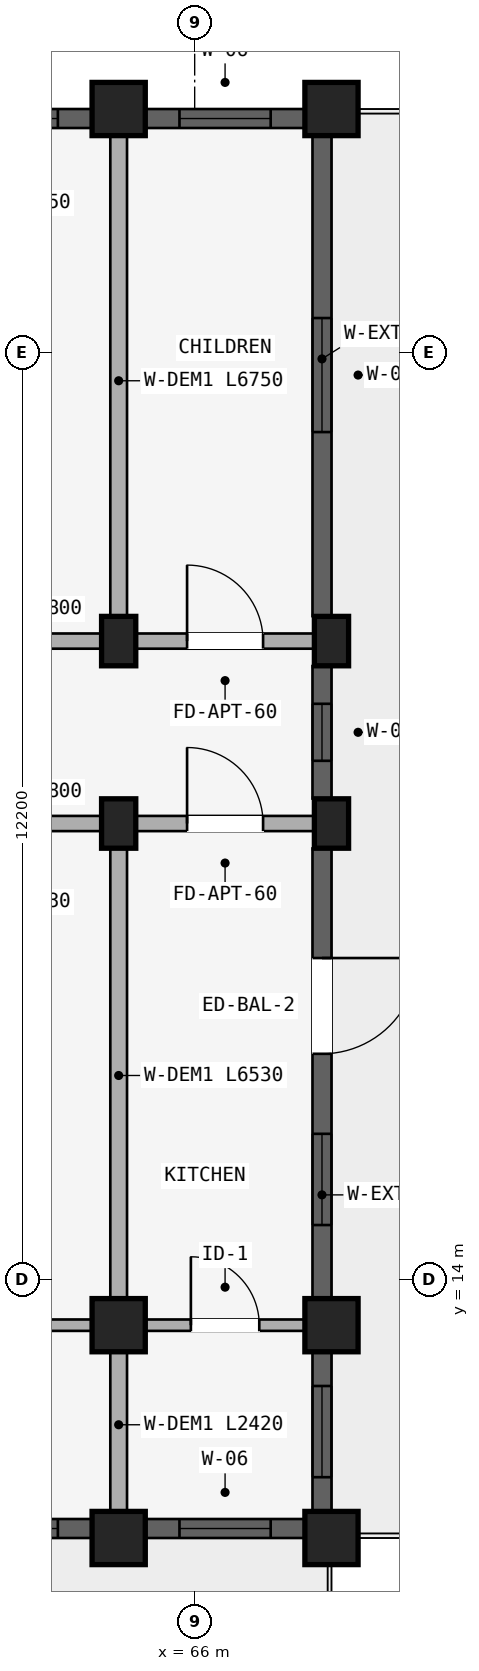
"""IFC4 building model, lengths in metres.
Left out: names, types, materials, properties, quantities, classifications, styles, units other than length and angle.
Written with IfcOpenShell. Run it as: python <this file> out.ifc"""

import sys

from ifc_helpers import new_model, si_unit, direction, frame, frame_2d, origin, origin_2d, place, context, subcontext, project, spatial, rectangle, extrude, element, fill, save


model = new_model("IFC4")
c1 = context("Model", 3, precision=1e-05, world=origin(), true_north=direction((0.0, 1.0)))
c2 = subcontext(c1, "Body", "Model", "MODEL_VIEW")
j1 = project(units=[si_unit("LENGTHUNIT", "METRE"), si_unit("PLANEANGLEUNIT", "RADIAN")], contexts=[c1])
p1 = place(None, origin())
s1 = spatial("IfcSite", under=j1, at=p1, CompositionType="ELEMENT")
p2 = place(p1, origin())
s2 = spatial("IfcBuilding", under=s1, at=p2, CompositionType="ELEMENT")
p3 = place(p2, frame((0.0, 0.0, 27.6)))
s3 = spatial("IfcBuildingStorey", under=s2, at=p3, CompositionType="ELEMENT", Elevation=27.6)
p4 = place(p3, frame((65.0, 29.4, 0.0), z_axis=(0.0, 0.0, 1.0), x_axis=(1.0, 0.0, 0.0)))
e1 = element("IfcColumn", 1, at=p4, inside=s3, PredefinedType="COLUMN", context=c2, shape_type="SweptSolid", body=[
    extrude(rectangle(XDim=0.7, YDim=0.7, at=origin_2d()), origin(), (0.0, 0.0, 1.0), 2.93),
])
for number, where, z_axis, x_axis in (
    (2, (65.0, 22.4, 0.0), (0.0, 0.0, 1.0), (1.0, 0.0, 0.0)),
    (3, (65.0, 20.0, 0.0), (0.0, 0.0, 1.0), (1.0, 0.0, 0.0)),
):
    element("IfcColumn", number, at=place(p3, frame(where, z_axis=z_axis, x_axis=x_axis)), inside=s3, PredefinedType="COLUMN", context=c2, shape_type="SweptSolid", body=[
        extrude(rectangle(XDim=0.45, YDim=0.65, at=origin_2d()), origin(), (0.0, 0.0, 1.0), 2.93),
    ])
p5 = place(p3, frame((65.0, 13.4, 0.0), z_axis=(0.0, 0.0, 1.0), x_axis=(1.0, 0.0, 0.0)))
e4 = element("IfcColumn", 4, at=p5, inside=s3, PredefinedType="COLUMN", context=c2, shape_type="SweptSolid", body=[
    extrude(rectangle(XDim=0.7, YDim=0.7, at=origin_2d()), origin(), (0.0, 0.0, 1.0), 2.93),
])
p6 = place(p3, frame((65.0, 10.6, 0.0), z_axis=(0.0, 0.0, 1.0), x_axis=(1.0, 0.0, 0.0)))
e5 = element("IfcColumn", 5, at=p6, inside=s3, PredefinedType="COLUMN", context=c2, shape_type="SweptSolid", body=[
    extrude(rectangle(XDim=0.7, YDim=0.7, at=origin_2d()), origin(), (0.0, 0.0, 1.0), 2.97),
])
p7 = place(p3, frame((67.8, 29.4, 0.0), z_axis=(0.0, 0.0, 1.0), x_axis=(1.0, 0.0, 0.0)))
e6 = element("IfcColumn", 6, at=p7, inside=s3, PredefinedType="COLUMN", context=c2, shape_type="SweptSolid", body=[
    extrude(rectangle(XDim=0.7, YDim=0.7, at=origin_2d()), origin(), (0.0, 0.0, 1.0), 2.93),
])
for number, where, z_axis, x_axis in (
    (7, (67.8, 22.4, 0.0), (0.0, 0.0, 1.0), (1.0, 0.0, 0.0)),
    (8, (67.8, 20.0, 0.0), (0.0, 0.0, 1.0), (1.0, 0.0, 0.0)),
):
    element("IfcColumn", number, at=place(p3, frame(where, z_axis=z_axis, x_axis=x_axis)), inside=s3, PredefinedType="COLUMN", context=c2, shape_type="SweptSolid", body=[
        extrude(rectangle(XDim=0.45, YDim=0.65, at=origin_2d()), origin(), (0.0, 0.0, 1.0), 2.93),
    ])
p8 = place(p3, frame((67.8, 13.4, 0.0), z_axis=(0.0, 0.0, 1.0), x_axis=(1.0, 0.0, 0.0)))
e9 = element("IfcColumn", 9, at=p8, inside=s3, PredefinedType="COLUMN", context=c2, shape_type="SweptSolid", body=[
    extrude(rectangle(XDim=0.7, YDim=0.7, at=origin_2d()), origin(), (0.0, 0.0, 1.0), 2.93),
])
p9 = place(p3, frame((67.8, 10.6, 0.0), z_axis=(0.0, 0.0, 1.0), x_axis=(1.0, 0.0, 0.0)))
e10 = element("IfcColumn", 10, at=p9, inside=s3, PredefinedType="COLUMN", context=c2, shape_type="SweptSolid", body=[
    extrude(rectangle(XDim=0.7, YDim=0.7, at=origin_2d()), origin(), (0.0, 0.0, 1.0), 2.97),
])
for number, where, z_axis, x_axis in (
    (11, (62.2, 22.4, 0.0), (0.0, 0.0, 1.0), (1.0, 0.0, 0.0)),
    (12, (62.2, 20.0, 0.0), (0.0, 0.0, 1.0), (1.0, 0.0, 0.0)),
):
    element("IfcWall", number, at=place(p3, frame(where, z_axis=z_axis, x_axis=x_axis)), inside=s3, PredefinedType="STANDARD", context=c2, shape_type="SweptSolid", body=[
        extrude(rectangle(XDim=2.8, YDim=0.2, at=frame_2d((1.4, 0.0))), origin(), (0.0, 0.0, 1.0), 2.372),
    ])
p10 = place(p3, frame((62.28, 13.4, 0.0), z_axis=(0.0, 0.0, 1.0), x_axis=(1.0, 0.0, 0.0)))
e13 = element("IfcWall", 13, at=p10, inside=s3, PredefinedType="PLUMBINGWALL", context=c2, shape_type="SweptSolid", body=[
    extrude(rectangle(XDim=2.64, YDim=0.15, at=frame_2d((1.32, 0.0))), origin(), (0.0, 0.0, 1.0), 2.372),
])
p11 = place(p10, frame((0.92, 0.0, 0.0)))
e14 = element("IfcOpeningElement", 14, at=p11, cuts=e13, PredefinedType="OPENING", context=c2, shape_type="SweptSolid", body=[
    extrude(rectangle(XDim=0.8, YDim=2.1, at=frame_2d((0.4, 1.05))), frame((0.0, 0.085, 0.0), z_axis=(0.0, -1.0, 0.0), x_axis=(1.0, 0.0, 0.0)), (0.0, 0.0, 1.0), 0.17),
])
p12 = place(p3, frame((65.0, 22.4, 0.0), z_axis=(0.0, 0.0, 1.0), x_axis=(1.0, 0.0, 0.0)))
e15 = element("IfcWall", 15, at=p12, inside=s3, PredefinedType="STANDARD", context=c2, shape_type="SweptSolid", body=[
    extrude(rectangle(XDim=2.8, YDim=0.2, at=frame_2d((1.4, 0.0))), origin(), (0.0, 0.0, 1.0), 2.372),
])
p13 = place(p12, frame((0.9, 0.0, 0.0)))
e16 = element("IfcOpeningElement", 16, at=p13, cuts=e15, PredefinedType="OPENING", context=c2, shape_type="SweptSolid", body=[
    extrude(rectangle(XDim=1.0, YDim=2.15, at=frame_2d((0.5, 1.075))), frame((0.0, 0.11, 0.0), z_axis=(0.0, -1.0, 0.0), x_axis=(1.0, 0.0, 0.0)), (0.0, 0.0, 1.0), 0.22),
])
p14 = place(p3, frame((65.0, 20.0, 0.0), z_axis=(0.0, 0.0, 1.0), x_axis=(1.0, 0.0, 0.0)))
e17 = element("IfcWall", 17, at=p14, inside=s3, PredefinedType="STANDARD", context=c2, shape_type="SweptSolid", body=[
    extrude(rectangle(XDim=2.8, YDim=0.2, at=frame_2d((1.4, 0.0))), origin(), (0.0, 0.0, 1.0), 2.372),
])
p15 = place(p14, frame((0.9, 0.0, 0.0)))
e18 = element("IfcOpeningElement", 18, at=p15, cuts=e17, PredefinedType="OPENING", context=c2, shape_type="SweptSolid", body=[
    extrude(rectangle(XDim=1.0, YDim=2.15, at=frame_2d((0.5, 1.075))), frame((0.0, 0.11, 0.0), z_axis=(0.0, -1.0, 0.0), x_axis=(1.0, 0.0, 0.0)), (0.0, 0.0, 1.0), 0.22),
])
p16 = place(p3, frame((65.08, 13.4, 0.0), z_axis=(0.0, 0.0, 1.0), x_axis=(1.0, 0.0, 0.0)))
e19 = element("IfcWall", 19, at=p16, inside=s3, PredefinedType="PLUMBINGWALL", context=c2, shape_type="SweptSolid", body=[
    extrude(rectangle(XDim=2.64, YDim=0.15, at=frame_2d((1.32, 0.0))), origin(), (0.0, 0.0, 1.0), 2.372),
])
p17 = place(p16, frame((0.87, 0.0, 0.0)))
e20 = element("IfcOpeningElement", 20, at=p17, cuts=e19, PredefinedType="OPENING", context=c2, shape_type="SweptSolid", body=[
    extrude(rectangle(XDim=0.9, YDim=2.1, at=frame_2d((0.45, 1.05))), frame((0.0, 0.085, 0.0), z_axis=(0.0, -1.0, 0.0), x_axis=(1.0, 0.0, 0.0)), (0.0, 0.0, 1.0), 0.17),
])
p18 = place(p3, frame((65.0, 29.2, 0.0), z_axis=(0.0, 0.0, 1.0), x_axis=(0.0, -1.0, 0.0)))
e21 = element("IfcWall", 21, at=p18, inside=s3, PredefinedType="STANDARD", context=c2, shape_type="SweptSolid", body=[
    extrude(rectangle(XDim=6.75, YDim=0.22, at=frame_2d((3.375, 0.0))), origin(), (0.0, 0.0, 1.0), 2.372),
])
p19 = place(p3, frame((65.0, 19.95, 0.0), z_axis=(0.0, 0.0, 1.0), x_axis=(0.0, -1.0, 0.0)))
e22 = element("IfcWall", 22, at=p19, inside=s3, PredefinedType="STANDARD", context=c2, shape_type="SweptSolid", body=[
    extrude(rectangle(XDim=6.53, YDim=0.22, at=frame_2d((3.265, 0.0))), origin(), (0.0, 0.0, 1.0), 2.372),
])
p20 = place(p3, frame((65.0, 13.3, 0.0), z_axis=(0.0, 0.0, 1.0), x_axis=(0.0, -1.0, 0.0)))
e23 = element("IfcWall", 23, at=p20, inside=s3, PredefinedType="STANDARD", context=c2, shape_type="SweptSolid", body=[
    extrude(rectangle(XDim=2.42, YDim=0.22, at=frame_2d((1.21, 0.0))), origin(), (0.0, 0.0, 1.0), 2.372),
])
p21 = place(p3, frame((62.553, 10.725, 0.0), z_axis=(0.0, 0.0, 1.0), x_axis=(1.0, 0.0, 0.0)))
e24 = element("IfcWall", 24, at=p21, inside=s3, PredefinedType="STANDARD", context=c2, shape_type="SweptSolid", body=[
    extrude(rectangle(XDim=2.093, YDim=0.25, at=frame_2d((1.046, 0.0))), origin(), (0.0, 0.0, 1.0), 2.48),
])
p22 = place(p21, frame((0.447, 0.0, 0.78)))
e25 = element("IfcOpeningElement", 25, at=p22, cuts=e24, PredefinedType="OPENING", context=c2, shape_type="SweptSolid", body=[
    extrude(rectangle(XDim=1.2, YDim=1.5, at=frame_2d((0.6, 0.75))), frame((0.0, 0.135, 0.0), z_axis=(0.0, -1.0, 0.0), x_axis=(1.0, 0.0, 0.0)), (0.0, 0.0, 1.0), 0.27),
])
p23 = place(p3, frame((65.354, 10.725, 0.0), z_axis=(0.0, 0.0, 1.0), x_axis=(1.0, 0.0, 0.0)))
e26 = element("IfcWall", 26, at=p23, inside=s3, PredefinedType="STANDARD", context=c2, shape_type="SweptSolid", body=[
    extrude(rectangle(XDim=2.093, YDim=0.25, at=frame_2d((1.046, 0.0))), origin(), (0.0, 0.0, 1.0), 2.48),
])
p24 = place(p23, frame((0.447, 0.0, 0.78)))
e27 = element("IfcOpeningElement", 27, at=p24, cuts=e26, PredefinedType="OPENING", context=c2, shape_type="SweptSolid", body=[
    extrude(rectangle(XDim=1.2, YDim=1.5, at=frame_2d((0.6, 0.75))), frame((0.0, 0.135, 0.0), z_axis=(0.0, -1.0, 0.0), x_axis=(1.0, 0.0, 0.0)), (0.0, 0.0, 1.0), 0.27),
])
p25 = place(p3, frame((62.553, 29.275, 0.0), z_axis=(0.0, 0.0, 1.0), x_axis=(1.0, 0.0, 0.0)))
e28 = element("IfcWall", 28, at=p25, inside=s3, PredefinedType="STANDARD", context=c2, shape_type="SweptSolid", body=[
    extrude(rectangle(XDim=2.093, YDim=0.25, at=frame_2d((1.046, 0.0))), origin(), (0.0, 0.0, 1.0), 2.472),
])
p26 = place(p25, frame((0.447, 0.0, 0.772)))
e29 = element("IfcOpeningElement", 29, at=p26, cuts=e28, PredefinedType="OPENING", context=c2, shape_type="SweptSolid", body=[
    extrude(rectangle(XDim=1.2, YDim=1.5, at=frame_2d((0.6, 0.75))), frame((0.0, 0.135, 0.0), z_axis=(0.0, -1.0, 0.0), x_axis=(1.0, 0.0, 0.0)), (0.0, 0.0, 1.0), 0.27),
])
p27 = place(p3, frame((65.354, 29.275, 0.0), z_axis=(0.0, 0.0, 1.0), x_axis=(1.0, 0.0, 0.0)))
e30 = element("IfcWall", 30, at=p27, inside=s3, PredefinedType="STANDARD", context=c2, shape_type="SweptSolid", body=[
    extrude(rectangle(XDim=2.093, YDim=0.25, at=frame_2d((1.046, 0.0))), origin(), (0.0, 0.0, 1.0), 2.472),
])
p28 = place(p27, frame((0.447, 0.0, 0.772)))
e31 = element("IfcOpeningElement", 31, at=p28, cuts=e30, PredefinedType="OPENING", context=c2, shape_type="SweptSolid", body=[
    extrude(rectangle(XDim=1.2, YDim=1.5, at=frame_2d((0.6, 0.75))), frame((0.0, 0.135, 0.0), z_axis=(0.0, -1.0, 0.0), x_axis=(1.0, 0.0, 0.0)), (0.0, 0.0, 1.0), 0.27),
])
p29 = place(p3, frame((67.675, 29.046, 0.0), z_axis=(0.0, 0.0, 1.0), x_axis=(0.0, -1.0, 0.0)))
e32 = element("IfcWall", 32, at=p29, inside=s3, PredefinedType="STANDARD", context=c2, shape_type="SweptSolid", body=[
    extrude(rectangle(XDim=6.318, YDim=0.25, at=frame_2d((3.159, 0.0))), origin(), (0.0, 0.0, 1.0), 2.372),
])
p30 = place(p29, frame((2.396, 0.0, 0.522)))
e33 = element("IfcOpeningElement", 33, at=p30, cuts=e32, PredefinedType="OPENING", context=c2, shape_type="SweptSolid", body=[
    extrude(rectangle(XDim=1.5, YDim=1.65, at=frame_2d((0.75, 0.825))), frame((0.0, 0.135, 0.0), z_axis=(0.0, -1.0, 0.0), x_axis=(1.0, 0.0, 0.0)), (0.0, 0.0, 1.0), 0.27),
])
p31 = place(p3, frame((67.675, 22.072, 0.0), z_axis=(0.0, 0.0, 1.0), x_axis=(0.0, -1.0, 0.0)))
e34 = element("IfcWall", 34, at=p31, inside=s3, PredefinedType="STANDARD", context=c2, shape_type="SweptSolid", body=[
    extrude(rectangle(XDim=1.743, YDim=0.25, at=frame_2d((0.872, 0.0))), origin(), (0.0, 0.0, 1.0), 2.372),
])
p32 = place(p31, frame((0.497, 0.0, 0.88)))
e35 = element("IfcOpeningElement", 35, at=p32, cuts=e34, PredefinedType="OPENING", context=c2, shape_type="SweptSolid", body=[
    extrude(rectangle(XDim=0.75, YDim=1.05, at=frame_2d((0.375, 0.525))), frame((0.0, 0.135, 0.0), z_axis=(0.0, -1.0, 0.0), x_axis=(1.0, 0.0, 0.0)), (0.0, 0.0, 1.0), 0.27),
])
p33 = place(p3, frame((67.675, 19.671, 0.0), z_axis=(0.0, 0.0, 1.0), x_axis=(0.0, -1.0, 0.0)))
e36 = element("IfcWall", 36, at=p33, inside=s3, PredefinedType="STANDARD", context=c2, shape_type="SweptSolid", body=[
    extrude(rectangle(XDim=5.918, YDim=0.25, at=frame_2d((2.959, 0.0))), origin(), (0.0, 0.0, 1.0), 2.372),
])
p34 = place(p33, frame((3.754, 0.0, 0.522)))
e37 = element("IfcOpeningElement", 37, at=p34, cuts=e36, PredefinedType="OPENING", context=c2, shape_type="SweptSolid", body=[
    extrude(rectangle(XDim=1.2, YDim=1.5, at=frame_2d((0.6, 0.75))), frame((0.0, 0.135, 0.0), z_axis=(0.0, -1.0, 0.0), x_axis=(1.0, 0.0, 0.0)), (0.0, 0.0, 1.0), 0.27),
])
p35 = place(p33, frame((1.441, 0.0, 0.0)))
e38 = element("IfcOpeningElement", 38, at=p35, cuts=e36, PredefinedType="OPENING", context=c2, shape_type="SweptSolid", body=[
    extrude(rectangle(XDim=1.26, YDim=2.15, at=frame_2d((0.63, 1.075))), frame((0.0, 0.135, 0.0), z_axis=(0.0, -1.0, 0.0), x_axis=(1.0, 0.0, 0.0)), (0.0, 0.0, 1.0), 0.27),
])
p36 = place(p3, frame((67.675, 13.046, 0.0), z_axis=(0.0, 0.0, 1.0), x_axis=(0.0, -1.0, 0.0)))
e39 = element("IfcWall", 39, at=p36, inside=s3, PredefinedType="STANDARD", context=c2, shape_type="SweptSolid", body=[
    extrude(rectangle(XDim=2.093, YDim=0.25, at=frame_2d((1.046, 0.0))), origin(), (0.0, 0.0, 1.0), 2.412),
])
p37 = place(p36, frame((0.447, 0.0, 0.712)))
e40 = element("IfcOpeningElement", 40, at=p37, cuts=e39, PredefinedType="OPENING", context=c2, shape_type="SweptSolid", body=[
    extrude(rectangle(XDim=1.2, YDim=1.5, at=frame_2d((0.6, 0.75))), frame((0.0, 0.135, 0.0), z_axis=(0.0, -1.0, 0.0), x_axis=(1.0, 0.0, 0.0)), (0.0, 0.0, 1.0), 0.27),
])
p38 = place(p22, origin())
e41 = element("IfcWindow", 41, at=p38, inside=s3, PartitioningType="SINGLE_PANEL", PredefinedType="WINDOW", context=c2, shape_type="SweptSolid", body=[
    extrude(rectangle(XDim=1.2, YDim=1.5, at=frame_2d((0.6, 0.75))), frame((0.0, 0.03, 0.0), z_axis=(0.0, -1.0, 0.0), x_axis=(1.0, 0.0, 0.0)), (0.0, 0.0, 1.0), 0.06),
])
fill(e25, e41)
p39 = place(p24, origin())
e42 = element("IfcWindow", 42, at=p39, inside=s3, PartitioningType="SINGLE_PANEL", PredefinedType="WINDOW", context=c2, shape_type="SweptSolid", body=[
    extrude(rectangle(XDim=1.2, YDim=1.5, at=frame_2d((0.6, 0.75))), frame((0.0, 0.03, 0.0), z_axis=(0.0, -1.0, 0.0), x_axis=(1.0, 0.0, 0.0)), (0.0, 0.0, 1.0), 0.06),
])
fill(e27, e42)
p40 = place(p26, origin())
e43 = element("IfcWindow", 43, at=p40, inside=s3, PartitioningType="SINGLE_PANEL", PredefinedType="WINDOW", context=c2, shape_type="SweptSolid", body=[
    extrude(rectangle(XDim=1.2, YDim=1.5, at=frame_2d((0.6, 0.75))), frame((0.0, 0.03, 0.0), z_axis=(0.0, -1.0, 0.0), x_axis=(1.0, 0.0, 0.0)), (0.0, 0.0, 1.0), 0.06),
])
fill(e29, e43)
p41 = place(p28, origin())
e44 = element("IfcWindow", 44, at=p41, inside=s3, PartitioningType="SINGLE_PANEL", PredefinedType="WINDOW", context=c2, shape_type="SweptSolid", body=[
    extrude(rectangle(XDim=1.2, YDim=1.5, at=frame_2d((0.6, 0.75))), frame((0.0, 0.03, 0.0), z_axis=(0.0, -1.0, 0.0), x_axis=(1.0, 0.0, 0.0)), (0.0, 0.0, 1.0), 0.06),
])
fill(e31, e44)
p42 = place(p30, origin())
e45 = element("IfcWindow", 45, at=p42, inside=s3, PartitioningType="DOUBLE_PANEL_VERTICAL", PredefinedType="WINDOW", context=c2, shape_type="SweptSolid", body=[
    extrude(rectangle(XDim=1.5, YDim=1.65, at=frame_2d((0.75, 0.825))), frame((0.0, 0.03, 0.0), z_axis=(0.0, -1.0, 0.0), x_axis=(1.0, 0.0, 0.0)), (0.0, 0.0, 1.0), 0.06),
])
fill(e33, e45)
p43 = place(p32, origin())
e46 = element("IfcWindow", 46, at=p43, inside=s3, PartitioningType="SINGLE_PANEL", PredefinedType="WINDOW", context=c2, shape_type="SweptSolid", body=[
    extrude(rectangle(XDim=0.75, YDim=1.05, at=frame_2d((0.375, 0.525))), frame((0.0, 0.03, 0.0), z_axis=(0.0, -1.0, 0.0), x_axis=(1.0, 0.0, 0.0)), (0.0, 0.0, 1.0), 0.06),
])
fill(e35, e46)
p44 = place(p34, origin())
e47 = element("IfcWindow", 47, at=p44, inside=s3, PartitioningType="SINGLE_PANEL", PredefinedType="WINDOW", context=c2, shape_type="SweptSolid", body=[
    extrude(rectangle(XDim=1.2, YDim=1.5, at=frame_2d((0.6, 0.75))), frame((0.0, 0.03, 0.0), z_axis=(0.0, -1.0, 0.0), x_axis=(1.0, 0.0, 0.0)), (0.0, 0.0, 1.0), 0.06),
])
fill(e37, e47)
p45 = place(p37, origin())
e48 = element("IfcWindow", 48, at=p45, inside=s3, PartitioningType="SINGLE_PANEL", PredefinedType="WINDOW", context=c2, shape_type="SweptSolid", body=[
    extrude(rectangle(XDim=1.2, YDim=1.5, at=frame_2d((0.6, 0.75))), frame((0.0, 0.03, 0.0), z_axis=(0.0, -1.0, 0.0), x_axis=(1.0, 0.0, 0.0)), (0.0, 0.0, 1.0), 0.06),
])
fill(e40, e48)
p46 = place(p13, origin())
e49 = element("IfcDoor", 49, at=p46, inside=s3, OperationType="SINGLE_SWING_LEFT", PredefinedType="DOOR", context=c2, shape_type="SweptSolid", body=[
    extrude(rectangle(XDim=1.0, YDim=2.15, at=frame_2d((0.5, 1.075))), frame((0.0, 0.025, 0.0), z_axis=(0.0, -1.0, 0.0), x_axis=(1.0, 0.0, 0.0)), (0.0, 0.0, 1.0), 0.05),
])
fill(e16, e49)
p47 = place(p17, frame((0.9, 0.0, 0.0), z_axis=(0.0, 0.0, 1.0), x_axis=(-1.0, 0.0, 0.0)))
e50 = element("IfcDoor", 50, at=p47, inside=s3, OperationType="SINGLE_SWING_RIGHT", PredefinedType="DOOR", context=c2, shape_type="SweptSolid", body=[
    extrude(rectangle(XDim=0.9, YDim=2.1, at=frame_2d((0.45, 1.05))), frame((0.0, 0.025, 0.0), z_axis=(0.0, -1.0, 0.0), x_axis=(1.0, 0.0, 0.0)), (0.0, 0.0, 1.0), 0.05),
])
fill(e20, e50)
p48 = place(p15, origin())
e51 = element("IfcDoor", 51, at=p48, inside=s3, OperationType="SINGLE_SWING_LEFT", PredefinedType="DOOR", context=c2, shape_type="SweptSolid", body=[
    extrude(rectangle(XDim=1.0, YDim=2.15, at=frame_2d((0.5, 1.075))), frame((0.0, 0.025, 0.0), z_axis=(0.0, -1.0, 0.0), x_axis=(1.0, 0.0, 0.0)), (0.0, 0.0, 1.0), 0.05),
])
fill(e18, e51)
p49 = place(p35, origin())
e52 = element("IfcDoor", 52, at=p49, inside=s3, OperationType="SINGLE_SWING_LEFT", PredefinedType="DOOR", context=c2, shape_type="SweptSolid", body=[
    extrude(rectangle(XDim=1.26, YDim=2.15, at=frame_2d((0.63, 1.075))), frame((0.0, 0.025, 0.0), z_axis=(0.0, -1.0, 0.0), x_axis=(1.0, 0.0, 0.0)), (0.0, 0.0, 1.0), 0.05),
])
fill(e38, e52)
save(model, sys.argv[1])
